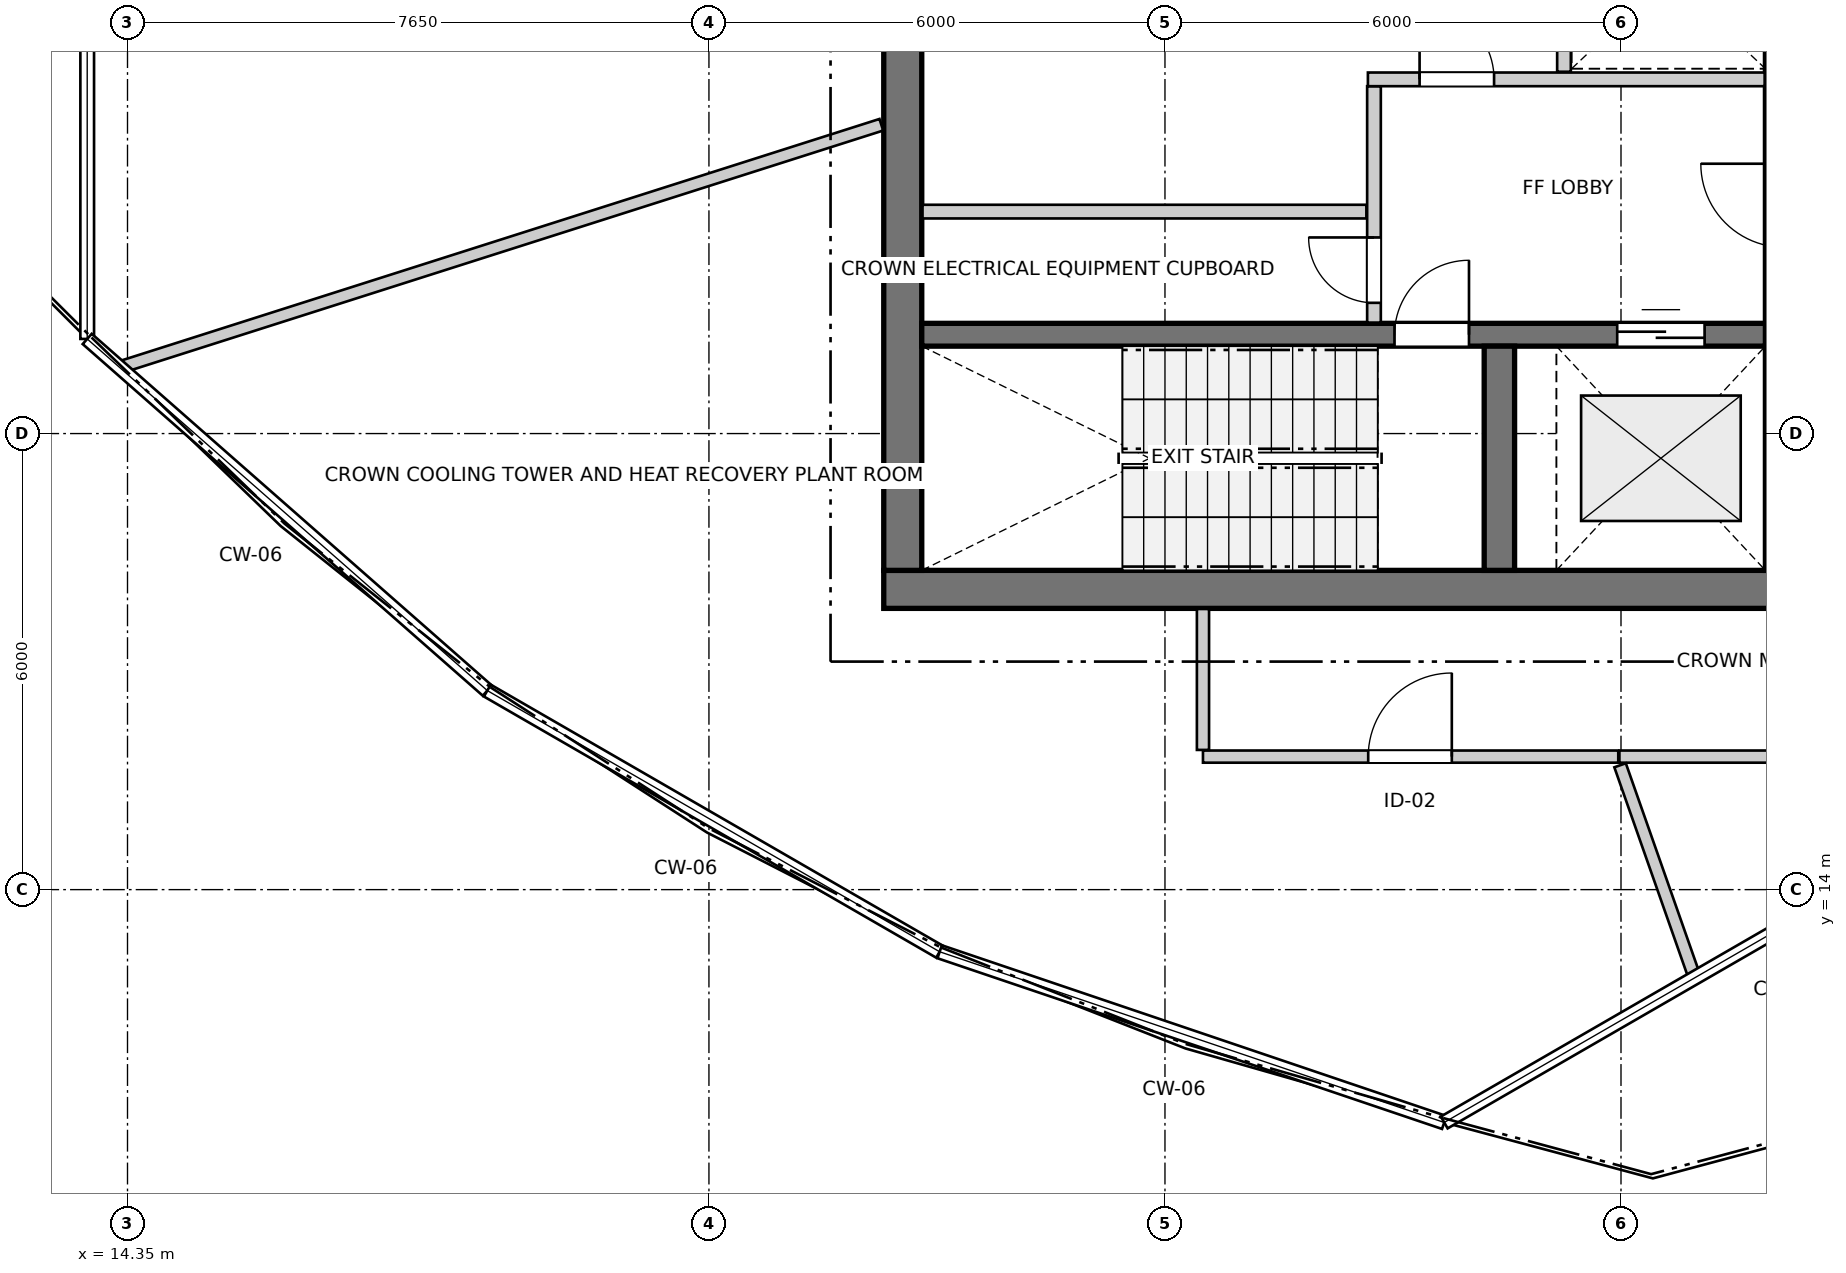
"""IFC4 building model, lengths in metres.
Left out: names, types, materials, properties, quantities, classifications, styles, units other than length and angle.
Written with IfcOpenShell. Run it as: python <this file> out.ifc"""

import sys

from ifc_helpers import new_model, si_unit, direction, frame, frame_2d, origin, place, context, subcontext, project, spatial, rectangle, extrude, source, transform, mapped, element, fill, save


model = new_model("IFC4")
c1 = context("Model", 3, precision=1e-05, world=origin(), true_north=direction((0.0, 1.0)))
c2 = subcontext(c1, "Body", "Model", "MODEL_VIEW")
j1 = project(units=[si_unit("LENGTHUNIT", "METRE"), si_unit("PLANEANGLEUNIT", "RADIAN")], contexts=[c1])
p1 = place(None, origin())
s1 = spatial("IfcSite", under=j1, at=p1, CompositionType="ELEMENT")
p2 = place(p1, origin())
s2 = spatial("IfcBuilding", under=s1, at=p2, CompositionType="ELEMENT")
p3 = place(p2, frame((0.0, 0.0, 253.2)))
s3 = spatial("IfcBuildingStorey", under=s2, at=p3, CompositionType="ELEMENT", Elevation=253.2)
p4 = place(p3, frame((24.3, 17.95, 0.0), z_axis=(0.0, 0.0, 1.0), x_axis=(1.0, 0.0, 0.0)))
e1 = element("IfcWall", 1, at=p4, inside=s3, PredefinedType="SHEAR", context=c2, shape_type="SweptSolid", body=[
    extrude(rectangle(XDim=12.1, YDim=0.5, at=frame_2d((6.05, 0.0))), origin(), (0.0, 0.0, 1.0), 4.05),
])
p5 = place(p3, frame((24.55, 33.8, 0.0), z_axis=(0.0, 0.0, 1.0), x_axis=(0.0, -1.0, 0.0)))
e2 = element("IfcWall", 2, at=p5, inside=s3, PredefinedType="SHEAR", context=c2, shape_type="SweptSolid", body=[
    extrude(rectangle(XDim=15.6, YDim=0.5, at=frame_2d((7.8, 0.0))), origin(), (0.0, 0.0, 1.0), 4.05),
])
p6 = place(p3, frame((36.15, 18.2, 0.0), z_axis=(0.0, 0.0, 1.0), x_axis=(0.0, 1.0, 0.0)))
e3 = element("IfcWall", 3, at=p6, inside=s3, PredefinedType="SHEAR", context=c2, shape_type="SweptSolid", body=[
    extrude(rectangle(XDim=15.6, YDim=0.5, at=frame_2d((7.8, 0.0))), origin(), (0.0, 0.0, 1.0), 4.05),
])
p7 = place(p6, frame((4.25, 0.0, 0.0)))
e4 = element("IfcOpeningElement", 4, at=p7, cuts=e3, PredefinedType="OPENING", context=c2, shape_type="SweptSolid", body=[
    extrude(rectangle(XDim=1.1, YDim=2.15, at=frame_2d((0.55, 1.075))), frame((0.0, 0.26, 0.0), z_axis=(0.0, -1.0, 0.0), x_axis=(1.0, 0.0, 0.0)), (0.0, 0.0, 1.0), 0.52),
])
p8 = place(p6, frame((10.25, 0.0, 0.0)))
e5 = element("IfcOpeningElement", 5, at=p8, cuts=e3, PredefinedType="OPENING", context=c2, shape_type="SweptSolid", body=[
    extrude(rectangle(XDim=1.1, YDim=2.15, at=frame_2d((0.55, 1.075))), frame((0.0, 0.26, 0.0), z_axis=(0.0, -1.0, 0.0), x_axis=(1.0, 0.0, 0.0)), (0.0, 0.0, 1.0), 0.52),
])
p9 = place(p3, frame((24.8, 21.3, 0.0), z_axis=(0.0, 0.0, 1.0), x_axis=(1.0, 0.0, 0.0)))
e6 = element("IfcWall", 6, at=p9, inside=s3, PredefinedType="SHEAR", context=c2, shape_type="SweptSolid", body=[
    extrude(rectangle(XDim=11.1, YDim=0.3, at=frame_2d((5.55, 0.0))), origin(), (0.0, 0.0, 1.0), 4.05),
])
p10 = place(p9, frame((6.22, 0.0, 0.0)))
e7 = element("IfcOpeningElement", 7, at=p10, cuts=e6, PredefinedType="OPENING", context=c2, shape_type="SweptSolid", body=[
    extrude(rectangle(XDim=0.98, YDim=2.15, at=frame_2d((0.49, 1.075))), frame((0.0, 0.16, 0.0), z_axis=(0.0, -1.0, 0.0), x_axis=(1.0, 0.0, 0.0)), (0.0, 0.0, 1.0), 0.32),
])
p11 = place(p9, frame((9.15, 0.0, 0.0)))
e8 = element("IfcOpeningElement", 8, at=p11, cuts=e6, PredefinedType="OPENING", context=c2, shape_type="SweptSolid", body=[
    extrude(rectangle(XDim=1.15, YDim=2.15, at=frame_2d((0.575, 1.075))), frame((0.0, 0.16, 0.0), z_axis=(0.0, -1.0, 0.0), x_axis=(1.0, 0.0, 0.0)), (0.0, 0.0, 1.0), 0.32),
])
p12 = place(p3, frame((32.4, 18.2, 0.0), z_axis=(0.0, 0.0, 1.0), x_axis=(0.0, 1.0, 0.0)))
e9 = element("IfcWall", 9, at=p12, inside=s3, PredefinedType="SHEAR", context=c2, shape_type="SweptSolid", body=[
    extrude(rectangle(XDim=2.95, YDim=0.4, at=frame_2d((1.475, 0.0))), origin(), (0.0, 0.0, 1.0), 4.05),
])
p13 = place(p3, frame((30.75, 21.46, 0.0), z_axis=(0.0, 0.0, 1.0), x_axis=(0.0, 1.0, 0.0)))
e10 = element("IfcWall", 10, at=p13, inside=s3, PredefinedType="PARTITIONING", context=c2, shape_type="SweptSolid", body=[
    extrude(rectangle(XDim=3.11, YDim=0.18, at=frame_2d((1.555, 0.0))), origin(), (0.0, 0.0, 1.0), 4.05),
])
p14 = place(p13, frame((0.26, 0.0, 0.0)))
e11 = element("IfcOpeningElement", 11, at=p14, cuts=e10, PredefinedType="OPENING", context=c2, shape_type="SweptSolid", body=[
    extrude(rectangle(XDim=0.86, YDim=2.05, at=frame_2d((0.43, 1.025))), frame((0.0, 0.1, 0.0), z_axis=(0.0, -1.0, 0.0), x_axis=(1.0, 0.0, 0.0)), (0.0, 0.0, 1.0), 0.2),
])
p15 = place(p3, frame((30.67, 24.66, 0.0), z_axis=(0.0, 0.0, 1.0), x_axis=(1.0, 0.0, 0.0)))
e12 = element("IfcWall", 12, at=p15, inside=s3, PredefinedType="PARTITIONING", context=c2, shape_type="SweptSolid", body=[
    extrude(rectangle(XDim=5.22, YDim=0.18, at=frame_2d((2.61, 0.0))), origin(), (0.0, 0.0, 1.0), 4.05),
])
p16 = place(p15, frame((0.68, 0.0, 0.0)))
e13 = element("IfcOpeningElement", 13, at=p16, cuts=e12, PredefinedType="OPENING", context=c2, shape_type="SweptSolid", body=[
    extrude(rectangle(XDim=0.98, YDim=2.15, at=frame_2d((0.49, 1.075))), frame((0.0, 0.1, 0.0), z_axis=(0.0, -1.0, 0.0), x_axis=(1.0, 0.0, 0.0)), (0.0, 0.0, 1.0), 0.2),
])
p17 = place(p3, frame((33.25, 24.76, 0.0), z_axis=(0.0, 0.0, 1.0), x_axis=(0.0, 1.0, 0.0)))
e14 = element("IfcWall", 14, at=p17, inside=s3, PredefinedType="PARTITIONING", context=c2, shape_type="SweptSolid", body=[
    extrude(rectangle(XDim=2.48, YDim=0.18, at=frame_2d((1.24, 0.0))), origin(), (0.0, 0.0, 1.0), 4.05),
])
p18 = place(p17, frame((0.615, 0.0, 0.0)))
e15 = element("IfcOpeningElement", 15, at=p18, cuts=e14, PredefinedType="OPENING", context=c2, shape_type="SweptSolid", body=[
    extrude(rectangle(XDim=1.25, YDim=2.15, at=frame_2d((0.625, 1.075))), frame((0.0, 0.1, 0.0), z_axis=(0.0, -1.0, 0.0), x_axis=(1.0, 0.0, 0.0)), (0.0, 0.0, 1.0), 0.2),
])
p19 = place(p3, frame((24.81, 22.92, 0.0), z_axis=(0.0, 0.0, 1.0), x_axis=(1.0, 0.0, 0.0)))
e16 = element("IfcWall", 16, at=p19, inside=s3, PredefinedType="PARTITIONING", context=c2, shape_type="SweptSolid", body=[
    extrude(rectangle(XDim=5.84, YDim=0.18, at=frame_2d((2.92, 0.0))), origin(), (0.0, 0.0, 1.0), 4.05),
])
p20 = place(p3, frame((28.5, 15.75, 0.0), z_axis=(0.0, 0.0, 1.0), x_axis=(1.0, 0.0, 0.0)))
e17 = element("IfcWall", 17, at=p20, inside=s3, PredefinedType="PARTITIONING", context=c2, shape_type="SweptSolid", body=[
    extrude(rectangle(XDim=5.464, YDim=0.16, at=frame_2d((2.732, 0.0))), origin(), (0.0, 0.0, 1.0), 4.05),
])
p21 = place(p20, frame((2.174, 0.0, 0.0)))
e18 = element("IfcOpeningElement", 18, at=p21, cuts=e17, PredefinedType="OPENING", context=c2, shape_type="SweptSolid", body=[
    extrude(rectangle(XDim=1.1, YDim=2.15, at=frame_2d((0.55, 1.075))), frame((0.0, 0.09, 0.0), z_axis=(0.0, -1.0, 0.0), x_axis=(1.0, 0.0, 0.0)), (0.0, 0.0, 1.0), 0.18),
])
p22 = place(p3, frame((14.274, 20.879, 0.0), z_axis=(0.0, 0.0, 1.0), x_axis=(0.952821173335, 0.303532225052, 0.0)))
e19 = element("IfcWall", 19, at=p22, inside=s3, PredefinedType="PARTITIONING", context=c2, shape_type="SweptSolid", body=[
    extrude(rectangle(XDim=10.489, YDim=0.16, at=frame_2d((5.244, 0.0))), origin(), (0.0, 0.0, 1.0), 3.318),
])
p23 = place(p3, frame((33.979, 15.75, 0.0), z_axis=(0.0, 0.0, 1.0), x_axis=(1.0, 0.0, 0.0)))
e20 = element("IfcWall", 20, at=p23, inside=s3, PredefinedType="PARTITIONING", context=c2, shape_type="SweptSolid", body=[
    extrude(rectangle(XDim=4.583, YDim=0.16, at=frame_2d((2.292, 0.0))), origin(), (0.0, 0.0, 1.0), 4.05),
])
p24 = place(p3, frame((33.988, 15.636, 0.0), z_axis=(0.0, 0.0, 1.0), x_axis=(0.331475994505, -0.943463653283, 0.0)))
e21 = element("IfcWall", 21, at=p24, inside=s3, PredefinedType="PARTITIONING", context=c2, shape_type="SweptSolid", body=[
    extrude(rectangle(XDim=2.937, YDim=0.16, at=frame_2d((1.468, 0.0))), origin(), (0.0, 0.0, 1.0), 4.05),
])
p25 = place(p3, frame((28.5, 15.838, 0.0), z_axis=(0.0, 0.0, 1.0), x_axis=(0.0, 1.0, 0.0)))
e22 = element("IfcWall", 22, at=p25, inside=s3, PredefinedType="PARTITIONING", context=c2, shape_type="SweptSolid", body=[
    extrude(rectangle(XDim=1.854, YDim=0.16, at=frame_2d((0.927, 0.0))), origin(), (0.0, 0.0, 1.0), 4.05),
])
m1 = source(origin(), c2, "Body", "SweptSolid", [
    extrude(rectangle(XDim=0.98, YDim=2.15, at=frame_2d((0.49, 1.075))), frame((0.0, 0.025, 0.0), z_axis=(0.0, -1.0, 0.0), x_axis=(1.0, 0.0, 0.0)), (0.0, 0.0, 1.0), 0.05),
])
p26 = place(p10, origin())
e23 = element("IfcDoor", 23, at=p26, inside=s3, OperationType="SINGLE_SWING_RIGHT", PredefinedType="DOOR", context=c2, shape_type="MappedRepresentation", body=[
    mapped(m1, transform((0.0, 0.0, 0.0), x_axis=(1.0, 0.0, 0.0), y_axis=(0.0, 1.0, 0.0), z_axis=(0.0, 0.0, 1.0), scale=1.0)),
])
fill(e7, e23)
m2 = source(origin(), c2, "Body", "SweptSolid", [
    extrude(rectangle(XDim=1.15, YDim=2.15, at=frame_2d((0.575, 1.075))), frame((0.0, 0.025, 0.0), z_axis=(0.0, -1.0, 0.0), x_axis=(1.0, 0.0, 0.0)), (0.0, 0.0, 1.0), 0.05),
])
p27 = place(p11, origin())
e24 = element("IfcDoor", 24, at=p27, inside=s3, OperationType="DOUBLE_DOOR_SLIDING", PredefinedType="DOOR", context=c2, shape_type="MappedRepresentation", body=[
    mapped(m2, transform((0.0, 0.0, 0.0), x_axis=(1.0, 0.0, 0.0), y_axis=(0.0, 1.0, 0.0), z_axis=(0.0, 0.0, 1.0), scale=1.0)),
])
fill(e8, e24)
m3 = source(origin(), c2, "Body", "SweptSolid", [
    extrude(rectangle(XDim=0.86, YDim=2.05, at=frame_2d((0.43, 1.025))), frame((0.0, 0.025, 0.0), z_axis=(0.0, -1.0, 0.0), x_axis=(1.0, 0.0, 0.0)), (0.0, 0.0, 1.0), 0.05),
])
p28 = place(p14, origin())
e25 = element("IfcDoor", 25, at=p28, inside=s3, OperationType="SINGLE_SWING_RIGHT", PredefinedType="DOOR", context=c2, shape_type="MappedRepresentation", body=[
    mapped(m3, transform((0.0, 0.0, 0.0), x_axis=(1.0, 0.0, 0.0), y_axis=(0.0, 1.0, 0.0), z_axis=(0.0, 0.0, 1.0), scale=1.0)),
])
fill(e11, e25)
p29 = place(p16, origin())
e26 = element("IfcDoor", 26, at=p29, inside=s3, OperationType="SINGLE_SWING_LEFT", PredefinedType="DOOR", context=c2, shape_type="MappedRepresentation", body=[
    mapped(m1, transform((0.0, 0.0, 0.0), x_axis=(1.0, 0.0, 0.0), y_axis=(0.0, 1.0, 0.0), z_axis=(0.0, 0.0, 1.0), scale=1.0)),
])
fill(e13, e26)
m4 = source(origin(), c2, "Body", "SweptSolid", [
    extrude(rectangle(XDim=1.1, YDim=2.15, at=frame_2d((0.55, 1.075))), frame((0.0, 0.025, 0.0), z_axis=(0.0, -1.0, 0.0), x_axis=(1.0, 0.0, 0.0)), (0.0, 0.0, 1.0), 0.05),
])
p30 = place(p21, origin())
e27 = element("IfcDoor", 27, at=p30, inside=s3, OperationType="SINGLE_SWING_RIGHT", PredefinedType="DOOR", context=c2, shape_type="MappedRepresentation", body=[
    mapped(m4, transform((0.0, 0.0, 0.0), x_axis=(1.0, 0.0, 0.0), y_axis=(0.0, 1.0, 0.0), z_axis=(0.0, 0.0, 1.0), scale=1.0)),
])
fill(e18, e27)
save(model, sys.argv[1])
